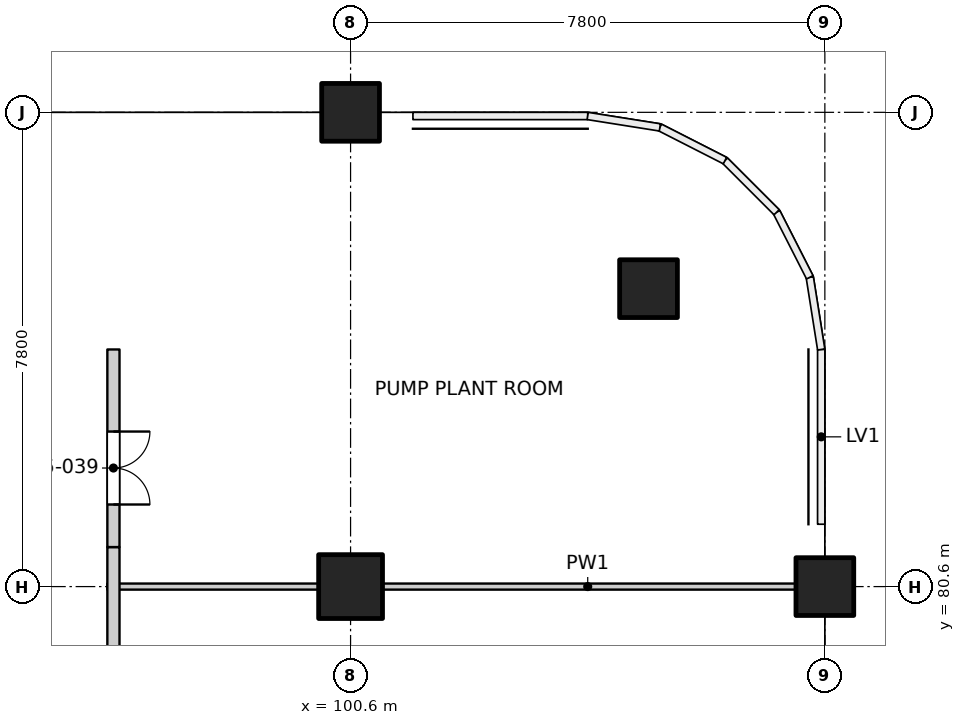
"""IFC4 building model, lengths in metres.
Left out: names, types, materials, properties, quantities, classifications, styles, units other than length and angle.
Written with IfcOpenShell. Run it as: python <this file> out.ifc"""

import sys

from ifc_helpers import new_model, si_unit, direction, frame, frame_2d, origin, origin_2d, place, context, subcontext, project, spatial, rectangle, extrude, element, fill, save


model = new_model("IFC4")
c1 = context("Model", 3, precision=1e-05, world=origin(), true_north=direction((0.0, 1.0)))
c2 = subcontext(c1, "Body", "Model", "MODEL_VIEW")
j1 = project(units=[si_unit("LENGTHUNIT", "METRE"), si_unit("PLANEANGLEUNIT", "RADIAN")], contexts=[c1])
p1 = place(None, origin())
s1 = spatial("IfcSite", under=j1, at=p1, CompositionType="ELEMENT")
p2 = place(p1, origin())
s2 = spatial("IfcBuilding", under=s1, at=p2, CompositionType="ELEMENT")
p3 = place(p2, frame((0.0, 0.0, 95.4)))
s3 = spatial("IfcBuildingStorey", under=s2, at=p3, CompositionType="ELEMENT", Elevation=95.4)
for number, where, z_axis, x_axis in (
    (1, (105.5, 85.5, -0.3), (0.0, 0.0, 1.0), (1.0, 0.0, 0.0)),
    (2, (108.4, 80.6, -0.3), (0.0, 0.0, 1.0), (1.0, 0.0, 0.0)),
    (3, (100.6, 88.4, -0.3), (0.0, 0.0, 1.0), (1.0, 0.0, 0.0)),
):
    element("IfcColumn", number, at=place(p3, frame(where, z_axis=z_axis, x_axis=x_axis)), inside=s3, PredefinedType="COLUMN", context=c2, shape_type="SweptSolid", body=[
        extrude(rectangle(XDim=0.95, YDim=0.95, at=origin_2d()), origin(), (0.0, 0.0, 1.0), 2.9),
    ])
p4 = place(p3, frame((100.6, 80.6, -0.3), z_axis=(0.0, 0.0, 1.0), x_axis=(1.0, 0.0, 0.0)))
e4 = element("IfcColumn", 4, at=p4, inside=s3, PredefinedType="COLUMN", context=c2, shape_type="SweptSolid", body=[
    extrude(rectangle(XDim=1.05, YDim=1.05, at=origin_2d()), origin(), (0.0, 0.0, 1.0), 2.9),
])
p5 = place(p3, frame((96.6, 80.6, 0.0), z_axis=(0.0, 0.0, 1.0), x_axis=(1.0, 0.0, 0.0)))
e5 = element("IfcWall", 5, at=p5, inside=s3, PredefinedType="PARTITIONING", context=c2, shape_type="SweptSolid", body=[
    extrude(rectangle(XDim=4.0, YDim=0.1, at=frame_2d((2.0, 0.0))), origin(), (0.0, 0.0, 1.0), 2.6),
])
p6 = place(p3, frame((100.6, 80.6, 0.0), z_axis=(0.0, 0.0, 1.0), x_axis=(1.0, 0.0, 0.0)))
e6 = element("IfcWall", 6, at=p6, inside=s3, PredefinedType="PARTITIONING", context=c2, shape_type="SweptSolid", body=[
    extrude(rectangle(XDim=7.8, YDim=0.1, at=frame_2d((3.9, 0.0))), origin(), (0.0, 0.0, 1.0), 4.2),
])
p7 = place(p3, frame((96.7, 55.35, 0.0), z_axis=(0.0, 0.0, 1.0), x_axis=(0.0, 1.0, 0.0)))
e7 = element("IfcWall", 7, at=p7, inside=s3, PredefinedType="PARTITIONING", context=c2, shape_type="SweptSolid", body=[
    extrude(rectangle(XDim=25.9, YDim=0.2, at=frame_2d((12.95, 0.0))), origin(), (0.0, 0.0, 1.0), 4.2),
])
p8 = place(p7, frame((0.35, 0.0, 0.0)))
e8 = element("IfcOpeningElement", 8, at=p8, cuts=e7, PredefinedType="OPENING", context=c2, shape_type="SweptSolid", body=[
    extrude(rectangle(XDim=1.2, YDim=2.1, at=frame_2d((0.6, 1.05))), frame((0.0, 0.11, 0.0), z_axis=(0.0, -1.0, 0.0), x_axis=(1.0, 0.0, 0.0)), (0.0, 0.0, 1.0), 0.22),
])
p9 = place(p7, frame((7.1, 0.0, 0.0)))
e9 = element("IfcOpeningElement", 9, at=p9, cuts=e7, PredefinedType="OPENING", context=c2, shape_type="SweptSolid", body=[
    extrude(rectangle(XDim=1.2, YDim=2.1, at=frame_2d((0.6, 1.05))), frame((0.0, 0.11, 0.0), z_axis=(0.0, -1.0, 0.0), x_axis=(1.0, 0.0, 0.0)), (0.0, 0.0, 1.0), 0.22),
])
p10 = place(p7, frame((11.0, 0.0, 0.0)))
e10 = element("IfcOpeningElement", 10, at=p10, cuts=e7, PredefinedType="OPENING", context=c2, shape_type="SweptSolid", body=[
    extrude(rectangle(XDim=1.2, YDim=2.1, at=frame_2d((0.6, 1.05))), frame((0.0, 0.11, 0.0), z_axis=(0.0, -1.0, 0.0), x_axis=(1.0, 0.0, 0.0)), (0.0, 0.0, 1.0), 0.22),
])
p11 = place(p3, frame((96.7, 81.25, 0.0), z_axis=(0.0, 0.0, 1.0), x_axis=(0.0, 1.0, 0.0)))
e11 = element("IfcWall", 11, at=p11, inside=s3, PredefinedType="PARTITIONING", context=c2, shape_type="SweptSolid", body=[
    extrude(rectangle(XDim=3.25, YDim=0.2, at=frame_2d((1.625, 0.0))), origin(), (0.0, 0.0, 1.0), 2.6),
])
p12 = place(p11, frame((0.7, 0.0, 0.0)))
e12 = element("IfcOpeningElement", 12, at=p12, cuts=e11, PredefinedType="OPENING", context=c2, shape_type="SweptSolid", body=[
    extrude(rectangle(XDim=1.2, YDim=2.1, at=frame_2d((0.6, 1.05))), frame((0.0, 0.11, 0.0), z_axis=(0.0, -1.0, 0.0), x_axis=(1.0, 0.0, 0.0)), (0.0, 0.0, 1.0), 0.22),
])
p13 = place(p12, origin())
e13 = element("IfcDoor", 13, at=p13, inside=s3, OperationType="DOUBLE_DOOR_SINGLE_SWING", PredefinedType="DOOR", context=c2, shape_type="SweptSolid", body=[
    extrude(rectangle(XDim=1.2, YDim=2.1, at=frame_2d((0.6, 1.05))), frame((0.0, 0.025, 0.0), z_axis=(0.0, -1.0, 0.0), x_axis=(1.0, 0.0, 0.0)), (0.0, 0.0, 1.0), 0.05),
])
fill(e12, e13)
save(model, sys.argv[1])
